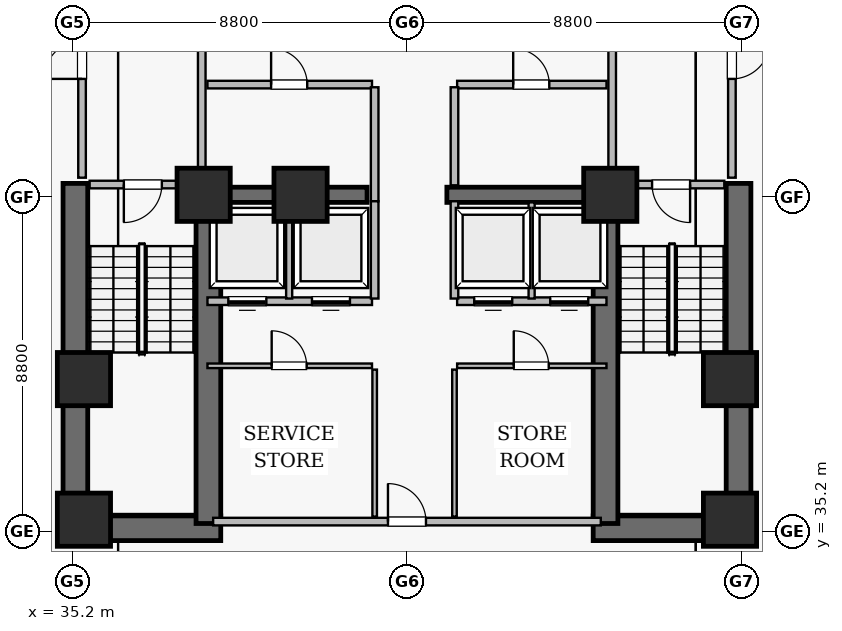
"""IFC4 building model, lengths in metres.
Left out: names, types, materials, properties, quantities, classifications, styles, units other than length and angle.
Written with IfcOpenShell. Run it as: python <this file> out.ifc"""

import sys

from ifc_helpers import new_model, si_unit, direction, frame, frame_2d, origin, origin_2d, place, context, subcontext, project, spatial, rectangle, extrude, element, fill, save


model = new_model("IFC4")
c1 = context("Model", 3, precision=1e-05, world=origin(), true_north=direction((0.0, 1.0)))
c2 = subcontext(c1, "Body", "Model", "MODEL_VIEW")
j1 = project(units=[si_unit("LENGTHUNIT", "METRE"), si_unit("PLANEANGLEUNIT", "RADIAN")], contexts=[c1])
p1 = place(None, origin())
s1 = spatial("IfcSite", under=j1, at=p1, CompositionType="ELEMENT")
p2 = place(p1, origin())
s2 = spatial("IfcBuilding", under=s1, at=p2, CompositionType="ELEMENT")
p3 = place(p2, frame((0.0, 0.0, -15.6)))
s3 = spatial("IfcBuildingStorey", under=s2, at=p3, CompositionType="ELEMENT", Elevation=-15.6)
for number, where, z_axis, x_axis in (
    (1, (34.95, 35.275, 0.0), (0.0, 0.0, 1.0), (1.0, 0.0, 0.0)),
    (2, (48.9, 35.275, 0.0), (0.0, 0.0, 1.0), (1.0, 0.0, 0.0)),
):
    element("IfcWall", number, at=place(p3, frame(where, z_axis=z_axis, x_axis=x_axis)), inside=s3, PredefinedType="SHEAR", context=c2, shape_type="SweptSolid", body=[
        extrude(rectangle(XDim=4.15, YDim=0.65, at=frame_2d((2.075, 0.0))), origin(), (0.0, 0.0, 1.0), 3.58),
    ])
for number, where, z_axis, x_axis in (
    (3, (35.275, 34.95, 0.0), (0.0, 0.0, 1.0), (0.0, 1.0, 0.0)),
    (4, (52.725, 34.95, 0.0), (0.0, 0.0, 1.0), (0.0, 1.0, 0.0)),
):
    element("IfcWall", number, at=place(p3, frame(where, z_axis=z_axis, x_axis=x_axis)), inside=s3, PredefinedType="SHEAR", context=c2, shape_type="SweptSolid", body=[
        extrude(rectangle(XDim=9.4, YDim=0.65, at=frame_2d((4.7, 0.0))), origin(), (0.0, 0.0, 1.0), 3.58),
    ])
for number, where, z_axis, x_axis in (
    (5, (38.775, 35.4, 0.0), (0.0, 0.0, 1.0), (0.0, 1.0, 0.0)),
    (6, (49.225, 35.4, 0.0), (0.0, 0.0, 1.0), (0.0, 1.0, 0.0)),
):
    element("IfcWall", number, at=place(p3, frame(where, z_axis=z_axis, x_axis=x_axis)), inside=s3, PredefinedType="SHEAR", context=c2, shape_type="SweptSolid", body=[
        extrude(rectangle(XDim=8.95, YDim=0.65, at=frame_2d((4.475, 0.0))), origin(), (0.0, 0.0, 1.0), 3.58),
    ])
for number, where, z_axis, x_axis in (
    (7, (38.75, 44.05, 0.0), (0.0, 0.0, 1.0), (1.0, 0.0, 0.0)),
    (8, (45.05, 44.05, 0.0), (0.0, 0.0, 1.0), (1.0, 0.0, 0.0)),
):
    element("IfcWall", number, at=place(p3, frame(where, z_axis=z_axis, x_axis=x_axis)), inside=s3, PredefinedType="SHEAR", context=c2, shape_type="SweptSolid", body=[
        extrude(rectangle(XDim=4.2, YDim=0.4, at=frame_2d((2.1, 0.0))), origin(), (0.0, 0.0, 1.0), 3.58),
    ])
for number, where, z_axis, x_axis in (
    (9, (35.5, 35.5, 0.0), (0.0, 0.0, 1.0), (1.0, 0.0, 0.0)),
    (10, (38.65, 44.05, 0.0), (0.0, 0.0, 1.0), (1.0, 0.0, 0.0)),
    (11, (52.5, 35.5, 0.0), (0.0, 0.0, 1.0), (1.0, 0.0, 0.0)),
    (12, (52.5, 39.2, 0.0), (0.0, 0.0, 1.0), (1.0, 0.0, 0.0)),
    (13, (49.35, 44.05, 0.0), (0.0, 0.0, 1.0), (1.0, 0.0, 0.0)),
    (14, (35.5, 39.2, 0.0), (0.0, 0.0, 1.0), (1.0, 0.0, 0.0)),
    (15, (41.2, 44.05, 0.0), (0.0, 0.0, 1.0), (1.0, 0.0, 0.0)),
):
    element("IfcColumn", number, at=place(p3, frame(where, z_axis=z_axis, x_axis=x_axis)), inside=s3, PredefinedType="COLUMN", context=c2, shape_type="SweptSolid", body=[
        extrude(rectangle(XDim=1.4, YDim=1.4, at=origin_2d()), origin(), (0.0, 0.0, 1.0), 3.9),
    ])
p4 = place(p3, frame((38.9, 35.45, 0.0), z_axis=(0.0, 0.0, 1.0), x_axis=(1.0, 0.0, 0.0)))
e16 = element("IfcWall", 16, at=p4, inside=s3, PredefinedType="SOLIDWALL", context=c2, shape_type="SweptSolid", body=[
    extrude(rectangle(XDim=10.2, YDim=0.2, at=frame_2d((5.1, 0.0))), origin(), (0.0, 0.0, 1.0), 3.58),
])
p5 = place(p4, frame((4.6, 0.0, 0.0)))
e17 = element("IfcOpeningElement", 17, at=p5, cuts=e16, PredefinedType="OPENING", context=c2, shape_type="SweptSolid", body=[
    extrude(rectangle(XDim=1.0, YDim=2.15, at=frame_2d((0.5, 1.075))), frame((0.0, 0.11, 0.0), z_axis=(0.0, -1.0, 0.0), x_axis=(1.0, 0.0, 0.0)), (0.0, 0.0, 1.0), 0.22),
])
p6 = place(p3, frame((35.45, 44.5, 0.0), z_axis=(0.0, 0.0, 1.0), x_axis=(0.0, 1.0, 0.0)))
e18 = element("IfcWall", 18, at=p6, inside=s3, PredefinedType="SOLIDWALL", context=c2, shape_type="SweptSolid", body=[
    extrude(rectangle(XDim=7.92, YDim=0.2, at=frame_2d((3.96, 0.0))), origin(), (0.0, 0.0, 1.0), 3.58),
])
p7 = place(p6, frame((2.6, 0.0, 0.0)))
e19 = element("IfcOpeningElement", 19, at=p7, cuts=e18, PredefinedType="OPENING", context=c2, shape_type="SweptSolid", body=[
    extrude(rectangle(XDim=1.0, YDim=2.15, at=frame_2d((0.5, 1.075))), frame((0.0, 0.11, 0.0), z_axis=(0.0, -1.0, 0.0), x_axis=(1.0, 0.0, 0.0)), (0.0, 0.0, 1.0), 0.22),
])
p8 = place(p3, frame((52.55, 44.5, 0.0), z_axis=(0.0, 0.0, 1.0), x_axis=(0.0, 1.0, 0.0)))
e20 = element("IfcWall", 20, at=p8, inside=s3, PredefinedType="SOLIDWALL", context=c2, shape_type="SweptSolid", body=[
    extrude(rectangle(XDim=7.92, YDim=0.2, at=frame_2d((3.96, 0.0))), origin(), (0.0, 0.0, 1.0), 3.58),
])
p9 = place(p8, frame((2.6, 0.0, 0.0)))
e21 = element("IfcOpeningElement", 21, at=p9, cuts=e20, PredefinedType="OPENING", context=c2, shape_type="SweptSolid", body=[
    extrude(rectangle(XDim=1.0, YDim=2.15, at=frame_2d((0.5, 1.075))), frame((0.0, 0.11, 0.0), z_axis=(0.0, -1.0, 0.0), x_axis=(1.0, 0.0, 0.0)), (0.0, 0.0, 1.0), 0.22),
])
p10 = place(p3, frame((38.6, 44.5, 0.0), z_axis=(0.0, 0.0, 1.0), x_axis=(0.0, 1.0, 0.0)))
e22 = element("IfcWall", 22, at=p10, inside=s3, PredefinedType="SOLIDWALL", context=c2, shape_type="SweptSolid", body=[
    extrude(rectangle(XDim=7.92, YDim=0.2, at=frame_2d((3.96, 0.0))), origin(), (0.0, 0.0, 1.0), 3.58),
])
p11 = place(p10, frame((3.425, 0.0, 0.0)))
e23 = element("IfcOpeningElement", 23, at=p11, cuts=e22, PredefinedType="OPENING", context=c2, shape_type="SweptSolid", body=[
    extrude(rectangle(XDim=0.95, YDim=2.15, at=frame_2d((0.475, 1.075))), frame((0.0, 0.11, 0.0), z_axis=(0.0, -1.0, 0.0), x_axis=(1.0, 0.0, 0.0)), (0.0, 0.0, 1.0), 0.22),
])
p12 = place(p3, frame((49.4, 44.5, 0.0), z_axis=(0.0, 0.0, 1.0), x_axis=(0.0, 1.0, 0.0)))
e24 = element("IfcWall", 24, at=p12, inside=s3, PredefinedType="SOLIDWALL", context=c2, shape_type="SweptSolid", body=[
    extrude(rectangle(XDim=7.92, YDim=0.2, at=frame_2d((3.96, 0.0))), origin(), (0.0, 0.0, 1.0), 3.58),
])
p13 = place(p12, frame((3.425, 0.0, 0.0)))
e25 = element("IfcOpeningElement", 25, at=p13, cuts=e24, PredefinedType="OPENING", context=c2, shape_type="SweptSolid", body=[
    extrude(rectangle(XDim=0.95, YDim=2.15, at=frame_2d((0.475, 1.075))), frame((0.0, 0.11, 0.0), z_axis=(0.0, -1.0, 0.0), x_axis=(1.0, 0.0, 0.0)), (0.0, 0.0, 1.0), 0.22),
])
p14 = place(p3, frame((38.75, 46.95, 0.0), z_axis=(0.0, 0.0, 1.0), x_axis=(1.0, 0.0, 0.0)))
e26 = element("IfcWall", 26, at=p14, inside=s3, PredefinedType="SOLIDWALL", context=c2, shape_type="SweptSolid", body=[
    extrude(rectangle(XDim=4.33, YDim=0.2, at=frame_2d((2.165, 0.0))), origin(), (0.0, 0.0, 1.0), 3.58),
])
p15 = place(p14, frame((1.675, 0.0, 0.0)))
e27 = element("IfcOpeningElement", 27, at=p15, cuts=e26, PredefinedType="OPENING", context=c2, shape_type="SweptSolid", body=[
    extrude(rectangle(XDim=0.95, YDim=2.15, at=frame_2d((0.475, 1.075))), frame((0.0, 0.11, 0.0), z_axis=(0.0, -1.0, 0.0), x_axis=(1.0, 0.0, 0.0)), (0.0, 0.0, 1.0), 0.22),
])
p16 = place(p3, frame((38.75, 41.25, 0.0), z_axis=(0.0, 0.0, 1.0), x_axis=(1.0, 0.0, 0.0)))
e28 = element("IfcWall", 28, at=p16, inside=s3, PredefinedType="SOLIDWALL", context=c2, shape_type="SweptSolid", body=[
    extrude(rectangle(XDim=4.33, YDim=0.2, at=frame_2d((2.165, 0.0))), origin(), (0.0, 0.0, 1.0), 3.58),
])
p17 = place(p16, frame((0.55, 0.0, 0.0)))
e29 = element("IfcOpeningElement", 29, at=p17, cuts=e28, PredefinedType="OPENING", context=c2, shape_type="SweptSolid", body=[
    extrude(rectangle(XDim=1.0, YDim=2.15, at=frame_2d((0.5, 1.075))), frame((0.0, 0.11, 0.0), z_axis=(0.0, -1.0, 0.0), x_axis=(1.0, 0.0, 0.0)), (0.0, 0.0, 1.0), 0.22),
])
p18 = place(p16, frame((2.75, 0.0, 0.0)))
e30 = element("IfcOpeningElement", 30, at=p18, cuts=e28, PredefinedType="OPENING", context=c2, shape_type="SweptSolid", body=[
    extrude(rectangle(XDim=1.0, YDim=2.15, at=frame_2d((0.5, 1.075))), frame((0.0, 0.11, 0.0), z_axis=(0.0, -1.0, 0.0), x_axis=(1.0, 0.0, 0.0)), (0.0, 0.0, 1.0), 0.22),
])
p19 = place(p3, frame((38.75, 39.55, 0.0), z_axis=(0.0, 0.0, 1.0), x_axis=(1.0, 0.0, 0.0)))
e31 = element("IfcWall", 31, at=p19, inside=s3, PredefinedType="PARTITIONING", context=c2, shape_type="SweptSolid", body=[
    extrude(rectangle(XDim=4.33, YDim=0.12, at=frame_2d((2.165, 0.0))), origin(), (0.0, 0.0, 1.0), 3.58),
])
p20 = place(p19, frame((1.69, 0.0, 0.0)))
e32 = element("IfcOpeningElement", 32, at=p20, cuts=e31, PredefinedType="OPENING", context=c2, shape_type="SweptSolid", body=[
    extrude(rectangle(XDim=0.92, YDim=2.1, at=frame_2d((0.46, 1.05))), frame((0.0, 0.07, 0.0), z_axis=(0.0, -1.0, 0.0), x_axis=(1.0, 0.0, 0.0)), (0.0, 0.0, 1.0), 0.14),
])
p21 = place(p3, frame((45.32, 46.95, 0.0), z_axis=(0.0, 0.0, 1.0), x_axis=(1.0, 0.0, 0.0)))
e33 = element("IfcWall", 33, at=p21, inside=s3, PredefinedType="SOLIDWALL", context=c2, shape_type="SweptSolid", body=[
    extrude(rectangle(XDim=3.93, YDim=0.2, at=frame_2d((1.965, 0.0))), origin(), (0.0, 0.0, 1.0), 2.918),
])
p22 = place(p21, frame((1.475, 0.0, 0.0)))
e34 = element("IfcOpeningElement", 34, at=p22, cuts=e33, PredefinedType="OPENING", context=c2, shape_type="SweptSolid", body=[
    extrude(rectangle(XDim=0.95, YDim=2.15, at=frame_2d((0.475, 1.075))), frame((0.0, 0.11, 0.0), z_axis=(0.0, -1.0, 0.0), x_axis=(1.0, 0.0, 0.0)), (0.0, 0.0, 1.0), 0.22),
])
p23 = place(p3, frame((45.32, 41.25, 0.0), z_axis=(0.0, 0.0, 1.0), x_axis=(1.0, 0.0, 0.0)))
e35 = element("IfcWall", 35, at=p23, inside=s3, PredefinedType="SOLIDWALL", context=c2, shape_type="SweptSolid", body=[
    extrude(rectangle(XDim=3.93, YDim=0.2, at=frame_2d((1.965, 0.0))), origin(), (0.0, 0.0, 1.0), 3.58),
])
p24 = place(p23, frame((0.45, 0.0, 0.0)))
e36 = element("IfcOpeningElement", 36, at=p24, cuts=e35, PredefinedType="OPENING", context=c2, shape_type="SweptSolid", body=[
    extrude(rectangle(XDim=1.0, YDim=2.15, at=frame_2d((0.5, 1.075))), frame((0.0, 0.11, 0.0), z_axis=(0.0, -1.0, 0.0), x_axis=(1.0, 0.0, 0.0)), (0.0, 0.0, 1.0), 0.22),
])
p25 = place(p23, frame((2.45, 0.0, 0.0)))
e37 = element("IfcOpeningElement", 37, at=p25, cuts=e35, PredefinedType="OPENING", context=c2, shape_type="SweptSolid", body=[
    extrude(rectangle(XDim=1.0, YDim=2.15, at=frame_2d((0.5, 1.075))), frame((0.0, 0.11, 0.0), z_axis=(0.0, -1.0, 0.0), x_axis=(1.0, 0.0, 0.0)), (0.0, 0.0, 1.0), 0.22),
])
p26 = place(p3, frame((45.32, 39.55, 0.0), z_axis=(0.0, 0.0, 1.0), x_axis=(1.0, 0.0, 0.0)))
e38 = element("IfcWall", 38, at=p26, inside=s3, PredefinedType="PARTITIONING", context=c2, shape_type="SweptSolid", body=[
    extrude(rectangle(XDim=3.93, YDim=0.12, at=frame_2d((1.965, 0.0))), origin(), (0.0, 0.0, 1.0), 3.58),
])
p27 = place(p26, frame((1.49, 0.0, 0.0)))
e39 = element("IfcOpeningElement", 39, at=p27, cuts=e38, PredefinedType="OPENING", context=c2, shape_type="SweptSolid", body=[
    extrude(rectangle(XDim=0.92, YDim=2.1, at=frame_2d((0.46, 1.05))), frame((0.0, 0.07, 0.0), z_axis=(0.0, -1.0, 0.0), x_axis=(1.0, 0.0, 0.0)), (0.0, 0.0, 1.0), 0.14),
])
p28 = place(p3, frame((35.65, 44.32, 0.0), z_axis=(0.0, 0.0, 1.0), x_axis=(1.0, 0.0, 0.0)))
e40 = element("IfcWall", 40, at=p28, inside=s3, PredefinedType="SOLIDWALL", context=c2, shape_type="SweptSolid", body=[
    extrude(rectangle(XDim=2.8, YDim=0.2, at=frame_2d((1.4, 0.0))), origin(), (0.0, 0.0, 1.0), 3.58),
])
p29 = place(p28, frame((0.9, 0.0, 0.0)))
e41 = element("IfcOpeningElement", 41, at=p29, cuts=e40, PredefinedType="OPENING", context=c2, shape_type="SweptSolid", body=[
    extrude(rectangle(XDim=1.0, YDim=2.15, at=frame_2d((0.5, 1.075))), frame((0.0, 0.11, 0.0), z_axis=(0.0, -1.0, 0.0), x_axis=(1.0, 0.0, 0.0)), (0.0, 0.0, 1.0), 0.22),
])
p30 = place(p3, frame((49.55, 44.32, 0.0), z_axis=(0.0, 0.0, 1.0), x_axis=(1.0, 0.0, 0.0)))
e42 = element("IfcWall", 42, at=p30, inside=s3, PredefinedType="SOLIDWALL", context=c2, shape_type="SweptSolid", body=[
    extrude(rectangle(XDim=2.8, YDim=0.2, at=frame_2d((1.4, 0.0))), origin(), (0.0, 0.0, 1.0), 3.58),
])
p31 = place(p30, frame((0.9, 0.0, 0.0)))
e43 = element("IfcOpeningElement", 43, at=p31, cuts=e42, PredefinedType="OPENING", context=c2, shape_type="SweptSolid", body=[
    extrude(rectangle(XDim=1.0, YDim=2.15, at=frame_2d((0.5, 1.075))), frame((0.0, 0.11, 0.0), z_axis=(0.0, -1.0, 0.0), x_axis=(1.0, 0.0, 0.0)), (0.0, 0.0, 1.0), 0.22),
])
for number, where, z_axis, x_axis in (
    (44, (43.15, 35.58, 0.0), (0.0, 0.0, 1.0), (0.0, 1.0, 0.0)),
    (45, (45.25, 35.58, 0.0), (0.0, 0.0, 1.0), (0.0, 1.0, 0.0)),
):
    element("IfcWall", number, at=place(p3, frame(where, z_axis=z_axis, x_axis=x_axis)), inside=s3, PredefinedType="PARTITIONING", context=c2, shape_type="SweptSolid", body=[
        extrude(rectangle(XDim=3.87, YDim=0.12, at=frame_2d((1.935, 0.0))), origin(), (0.0, 0.0, 1.0), 3.58),
    ])
p32 = place(p3, frame((43.15, 43.88, 0.0), z_axis=(0.0, 0.0, 1.0), x_axis=(0.0, 1.0, 0.0)))
e46 = element("IfcWall", 46, at=p32, inside=s3, PredefinedType="SOLIDWALL", context=c2, shape_type="SweptSolid", body=[
    extrude(rectangle(XDim=3.0, YDim=0.2, at=frame_2d((1.5, 0.0))), origin(), (0.0, 0.0, 1.0), 3.58),
])
p33 = place(p3, frame((45.25, 44.3, 0.0), z_axis=(0.0, 0.0, 1.0), x_axis=(0.0, 1.0, 0.0)))
e47 = element("IfcWall", 47, at=p33, inside=s3, PredefinedType="SOLIDWALL", context=c2, shape_type="SweptSolid", body=[
    extrude(rectangle(XDim=2.58, YDim=0.2, at=frame_2d((1.29, 0.0))), origin(), (0.0, 0.0, 1.0), 3.58),
])
for number, where, z_axis, x_axis in (
    (48, (43.15, 41.32, 0.0), (0.0, 0.0, 1.0), (0.0, 1.0, 0.0)),
    (49, (45.25, 41.32, 0.0), (0.0, 0.0, 1.0), (0.0, 1.0, 0.0)),
):
    element("IfcWall", number, at=place(p3, frame(where, z_axis=z_axis, x_axis=x_axis)), inside=s3, PredefinedType="SOLIDWALL", context=c2, shape_type="SweptSolid", body=[
        extrude(rectangle(XDim=2.56, YDim=0.2, at=frame_2d((1.28, 0.0))), origin(), (0.0, 0.0, 1.0), 3.58),
    ])
for number, where, z_axis, x_axis in (
    (50, (40.9, 41.32, 0.0), (0.0, 0.0, 1.0), (0.0, 1.0, 0.0)),
    (51, (47.28, 41.32, 0.0), (0.0, 0.0, 1.0), (0.0, 1.0, 0.0)),
):
    element("IfcWall", number, at=place(p3, frame(where, z_axis=z_axis, x_axis=x_axis)), inside=s3, PredefinedType="SOLIDWALL", context=c2, shape_type="SweptSolid", body=[
        extrude(rectangle(XDim=2.53, YDim=0.16, at=frame_2d((1.265, 0.0))), origin(), (0.0, 0.0, 1.0), 3.58),
    ])
p34 = place(p29, frame((1.0, 0.0, 0.0), z_axis=(0.0, 0.0, 1.0), x_axis=(-1.0, 0.0, 0.0)))
e52 = element("IfcDoor", 52, at=p34, inside=s3, OperationType="SINGLE_SWING_LEFT", PredefinedType="DOOR", context=c2, shape_type="SweptSolid", body=[
    extrude(rectangle(XDim=1.0, YDim=2.15, at=frame_2d((0.5, 1.075))), frame((0.0, 0.025, 0.0), z_axis=(0.0, -1.0, 0.0), x_axis=(1.0, 0.0, 0.0)), (0.0, 0.0, 1.0), 0.05),
])
fill(e41, e52)
p35 = place(p31, frame((1.0, 0.0, 0.0), z_axis=(0.0, 0.0, 1.0), x_axis=(-1.0, 0.0, 0.0)))
e53 = element("IfcDoor", 53, at=p35, inside=s3, OperationType="SINGLE_SWING_RIGHT", PredefinedType="DOOR", context=c2, shape_type="SweptSolid", body=[
    extrude(rectangle(XDim=1.0, YDim=2.15, at=frame_2d((0.5, 1.075))), frame((0.0, 0.025, 0.0), z_axis=(0.0, -1.0, 0.0), x_axis=(1.0, 0.0, 0.0)), (0.0, 0.0, 1.0), 0.05),
])
fill(e43, e53)
p36 = place(p7, origin())
e54 = element("IfcDoor", 54, at=p36, inside=s3, OperationType="SINGLE_SWING_LEFT", PredefinedType="DOOR", context=c2, shape_type="SweptSolid", body=[
    extrude(rectangle(XDim=1.0, YDim=2.15, at=frame_2d((0.5, 1.075))), frame((0.0, 0.025, 0.0), z_axis=(0.0, -1.0, 0.0), x_axis=(1.0, 0.0, 0.0)), (0.0, 0.0, 1.0), 0.05),
])
fill(e19, e54)
p37 = place(p9, frame((1.0, 0.0, 0.0), z_axis=(0.0, 0.0, 1.0), x_axis=(-1.0, 0.0, 0.0)))
e55 = element("IfcDoor", 55, at=p37, inside=s3, OperationType="SINGLE_SWING_RIGHT", PredefinedType="DOOR", context=c2, shape_type="SweptSolid", body=[
    extrude(rectangle(XDim=1.0, YDim=2.15, at=frame_2d((0.5, 1.075))), frame((0.0, 0.025, 0.0), z_axis=(0.0, -1.0, 0.0), x_axis=(1.0, 0.0, 0.0)), (0.0, 0.0, 1.0), 0.05),
])
fill(e21, e55)
p38 = place(p5, origin())
e56 = element("IfcDoor", 56, at=p38, inside=s3, OperationType="SINGLE_SWING_LEFT", PredefinedType="DOOR", context=c2, shape_type="SweptSolid", body=[
    extrude(rectangle(XDim=1.0, YDim=2.15, at=frame_2d((0.5, 1.075))), frame((0.0, 0.025, 0.0), z_axis=(0.0, -1.0, 0.0), x_axis=(1.0, 0.0, 0.0)), (0.0, 0.0, 1.0), 0.05),
])
fill(e17, e56)
p39 = place(p15, origin())
e57 = element("IfcDoor", 57, at=p39, inside=s3, OperationType="SINGLE_SWING_LEFT", PredefinedType="DOOR", context=c2, shape_type="SweptSolid", body=[
    extrude(rectangle(XDim=0.95, YDim=2.15, at=frame_2d((0.475, 1.075))), frame((0.0, 0.025, 0.0), z_axis=(0.0, -1.0, 0.0), x_axis=(1.0, 0.0, 0.0)), (0.0, 0.0, 1.0), 0.05),
])
fill(e27, e57)
p40 = place(p22, origin())
e58 = element("IfcDoor", 58, at=p40, inside=s3, OperationType="SINGLE_SWING_LEFT", PredefinedType="DOOR", context=c2, shape_type="SweptSolid", body=[
    extrude(rectangle(XDim=0.95, YDim=2.15, at=frame_2d((0.475, 1.075))), frame((0.0, 0.025, 0.0), z_axis=(0.0, -1.0, 0.0), x_axis=(1.0, 0.0, 0.0)), (0.0, 0.0, 1.0), 0.05),
])
fill(e34, e58)
p41 = place(p17, frame((1.0, 0.0, 0.0), z_axis=(0.0, 0.0, 1.0), x_axis=(-1.0, 0.0, 0.0)))
e59 = element("IfcDoor", 59, at=p41, inside=s3, OperationType="SLIDING_TO_LEFT", PredefinedType="DOOR", context=c2, shape_type="SweptSolid", body=[
    extrude(rectangle(XDim=1.0, YDim=2.15, at=frame_2d((0.5, 1.075))), frame((0.0, 0.025, 0.0), z_axis=(0.0, -1.0, 0.0), x_axis=(1.0, 0.0, 0.0)), (0.0, 0.0, 1.0), 0.05),
])
fill(e29, e59)
p42 = place(p18, frame((1.0, 0.0, 0.0), z_axis=(0.0, 0.0, 1.0), x_axis=(-1.0, 0.0, 0.0)))
e60 = element("IfcDoor", 60, at=p42, inside=s3, OperationType="SLIDING_TO_LEFT", PredefinedType="DOOR", context=c2, shape_type="SweptSolid", body=[
    extrude(rectangle(XDim=1.0, YDim=2.15, at=frame_2d((0.5, 1.075))), frame((0.0, 0.025, 0.0), z_axis=(0.0, -1.0, 0.0), x_axis=(1.0, 0.0, 0.0)), (0.0, 0.0, 1.0), 0.05),
])
fill(e30, e60)
p43 = place(p24, frame((1.0, 0.0, 0.0), z_axis=(0.0, 0.0, 1.0), x_axis=(-1.0, 0.0, 0.0)))
e61 = element("IfcDoor", 61, at=p43, inside=s3, OperationType="SLIDING_TO_LEFT", PredefinedType="DOOR", context=c2, shape_type="SweptSolid", body=[
    extrude(rectangle(XDim=1.0, YDim=2.15, at=frame_2d((0.5, 1.075))), frame((0.0, 0.025, 0.0), z_axis=(0.0, -1.0, 0.0), x_axis=(1.0, 0.0, 0.0)), (0.0, 0.0, 1.0), 0.05),
])
fill(e36, e61)
p44 = place(p25, frame((1.0, 0.0, 0.0), z_axis=(0.0, 0.0, 1.0), x_axis=(-1.0, 0.0, 0.0)))
e62 = element("IfcDoor", 62, at=p44, inside=s3, OperationType="SLIDING_TO_LEFT", PredefinedType="DOOR", context=c2, shape_type="SweptSolid", body=[
    extrude(rectangle(XDim=1.0, YDim=2.15, at=frame_2d((0.5, 1.075))), frame((0.0, 0.025, 0.0), z_axis=(0.0, -1.0, 0.0), x_axis=(1.0, 0.0, 0.0)), (0.0, 0.0, 1.0), 0.05),
])
fill(e37, e62)
p45 = place(p20, origin())
e63 = element("IfcDoor", 63, at=p45, inside=s3, OperationType="SINGLE_SWING_LEFT", PredefinedType="DOOR", context=c2, shape_type="SweptSolid", body=[
    extrude(rectangle(XDim=0.92, YDim=2.1, at=frame_2d((0.46, 1.05))), frame((0.0, 0.025, 0.0), z_axis=(0.0, -1.0, 0.0), x_axis=(1.0, 0.0, 0.0)), (0.0, 0.0, 1.0), 0.05),
])
fill(e32, e63)
p46 = place(p27, origin())
e64 = element("IfcDoor", 64, at=p46, inside=s3, OperationType="SINGLE_SWING_LEFT", PredefinedType="DOOR", context=c2, shape_type="SweptSolid", body=[
    extrude(rectangle(XDim=0.92, YDim=2.1, at=frame_2d((0.46, 1.05))), frame((0.0, 0.025, 0.0), z_axis=(0.0, -1.0, 0.0), x_axis=(1.0, 0.0, 0.0)), (0.0, 0.0, 1.0), 0.05),
])
fill(e39, e64)
save(model, sys.argv[1])
